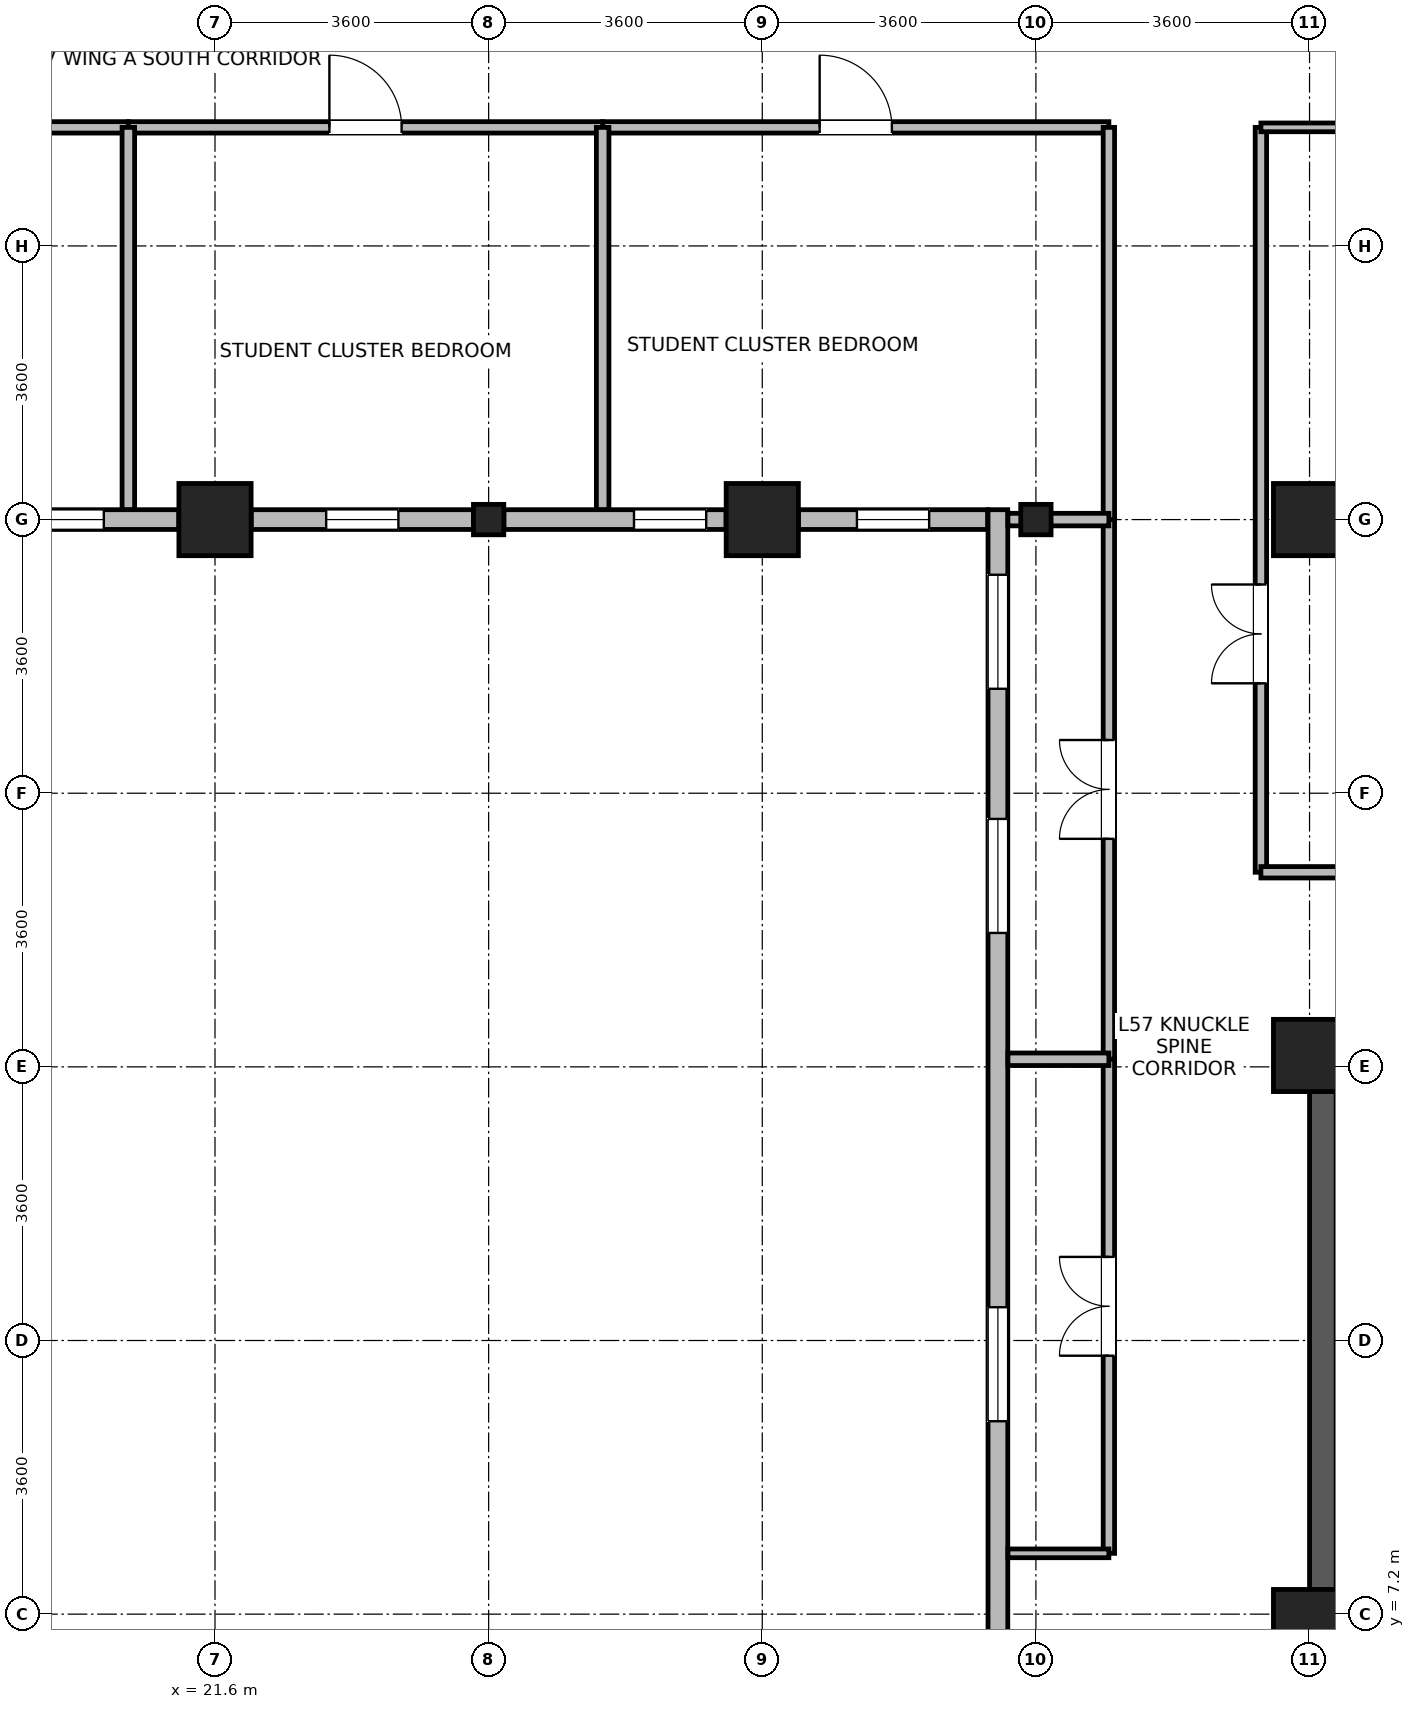
"""IFC4 building model, lengths in metres.
Left out: names, types, materials, properties, quantities, classifications, styles, units other than length and angle.
Written with IfcOpenShell. Run it as: python <this file> out.ifc"""

import sys

from ifc_helpers import new_model, si_unit, direction, frame, frame_2d, origin, origin_2d, place, context, subcontext, project, spatial, rectangle, i_section, extrude, source, transform, mapped, element, fill, save


model = new_model("IFC4")
c1 = context("Model", 3, precision=1e-05, world=origin(), true_north=direction((0.0, 1.0)))
c2 = subcontext(c1, "Body", "Model", "MODEL_VIEW")
j1 = project(units=[si_unit("LENGTHUNIT", "METRE"), si_unit("PLANEANGLEUNIT", "RADIAN")], contexts=[c1])
p1 = place(None, origin())
s1 = spatial("IfcSite", under=j1, at=p1, CompositionType="ELEMENT")
p2 = place(p1, origin())
s2 = spatial("IfcBuilding", under=s1, at=p2, CompositionType="ELEMENT")
p3 = place(p2, frame((0.0, 0.0, 224.0)))
s3 = spatial("IfcBuildingStorey", under=s2, at=p3, CompositionType="ELEMENT", Elevation=224.0)
p4 = place(p3, frame((36.175, 6.95, 0.0), z_axis=(0.0, 0.0, 1.0), x_axis=(0.0, 1.0, 0.0)))
e1 = element("IfcWall", 1, at=p4, inside=s3, PredefinedType="SHEAR", context=c2, shape_type="SweptSolid", body=[
    extrude(rectangle(XDim=7.7, YDim=0.35, at=frame_2d((3.85, 0.0))), origin(), (0.0, 0.0, 1.0), 3.47),
])
m1 = source(origin(), c2, "Body", "SweptSolid", [
    extrude(rectangle(XDim=0.95, YDim=0.95, at=origin_2d()), origin(), (0.0, 0.0, 1.0), 3.7),
])
for number, where, z_axis, x_axis in (
    (2, (21.6, 21.6, 0.0), (0.0, 0.0, 1.0), (1.0, 0.0, 0.0)),
    (3, (28.8, 21.6, 0.0), (0.0, 0.0, 1.0), (1.0, 0.0, 0.0)),
    (4, (36.0, 21.6, 0.0), (0.0, 0.0, 1.0), (1.0, 0.0, 0.0)),
    (5, (36.0, 7.05, 0.0), (0.0, 0.0, 1.0), (1.0, 0.0, 0.0)),
    (6, (36.0, 14.55, 0.0), (0.0, 0.0, 1.0), (1.0, 0.0, 0.0)),
):
    element("IfcColumn", number, at=place(p3, frame(where, z_axis=z_axis, x_axis=x_axis)), inside=s3, PredefinedType="COLUMN", context=c2, shape_type="MappedRepresentation", body=[
        mapped(m1, transform((0.0, 0.0, 0.0), x_axis=(1.0, 0.0, 0.0), y_axis=(0.0, 1.0, 0.0), z_axis=(0.0, 0.0, 1.0), scale=1.0)),
    ])
m2 = source(origin(), c2, "Body", "SweptSolid", [
    extrude(i_section(OverallWidth=0.399, OverallDepth=0.4, WebThickness=0.017, FlangeThickness=0.023, FilletRadius=0.015, at=origin_2d()), origin(), (0.0, 0.0, 1.0), 3.7),
])
for number, where, z_axis, x_axis in (
    (7, (25.2, 21.6, 0.0), (0.0, 0.0, 1.0), (1.0, 0.0, 0.0)),
    (8, (32.4, 21.6, 0.0), (0.0, 0.0, 1.0), (1.0, 0.0, 0.0)),
):
    element("IfcColumn", number, at=place(p3, frame(where, z_axis=z_axis, x_axis=x_axis)), inside=s3, PredefinedType="COLUMN", context=c2, shape_type="MappedRepresentation", body=[
        mapped(m2, transform((0.0, 0.0, 0.0), x_axis=(1.0, 0.0, 0.0), y_axis=(0.0, 1.0, 0.0), z_axis=(0.0, 0.0, 1.0), scale=1.0)),
    ])
p5 = place(p3, frame((21.124, 21.6, 0.0), z_axis=(0.0, 0.0, 1.0), x_axis=(-1.0, 0.0, 0.0)))
e9 = element("IfcWall", 9, at=p5, inside=s3, PredefinedType="STANDARD", context=c2, shape_type="SweptSolid", body=[
    extrude(rectangle(XDim=2.924, YDim=0.26, at=frame_2d((1.462, 0.0))), origin(), (0.0, 0.0, 1.0), 3.05),
])
p6 = place(p5, frame((0.987, 0.0, 0.85)))
e10 = element("IfcOpeningElement", 10, at=p6, cuts=e9, PredefinedType="OPENING", context=c2, shape_type="SweptSolid", body=[
    extrude(rectangle(XDim=0.95, YDim=1.75, at=frame_2d((0.475, 0.875))), frame((0.0, 0.14, 0.0), z_axis=(0.0, -1.0, 0.0), x_axis=(1.0, 0.0, 0.0)), (0.0, 0.0, 1.0), 0.28),
])
p7 = place(p3, frame((25.0, 21.6, 0.0), z_axis=(0.0, 0.0, 1.0), x_axis=(-1.0, 0.0, 0.0)))
e11 = element("IfcWall", 11, at=p7, inside=s3, PredefinedType="STANDARD", context=c2, shape_type="SweptSolid", body=[
    extrude(rectangle(XDim=2.924, YDim=0.26, at=frame_2d((1.462, 0.0))), origin(), (0.0, 0.0, 1.0), 3.05),
])
p8 = place(p7, frame((0.987, 0.0, 0.85)))
e12 = element("IfcOpeningElement", 12, at=p8, cuts=e11, PredefinedType="OPENING", context=c2, shape_type="SweptSolid", body=[
    extrude(rectangle(XDim=0.95, YDim=1.75, at=frame_2d((0.475, 0.875))), frame((0.0, 0.14, 0.0), z_axis=(0.0, -1.0, 0.0), x_axis=(1.0, 0.0, 0.0)), (0.0, 0.0, 1.0), 0.28),
])
p9 = place(p3, frame((28.324, 21.6, 0.0), z_axis=(0.0, 0.0, 1.0), x_axis=(-1.0, 0.0, 0.0)))
e13 = element("IfcWall", 13, at=p9, inside=s3, PredefinedType="STANDARD", context=c2, shape_type="SweptSolid", body=[
    extrude(rectangle(XDim=2.924, YDim=0.26, at=frame_2d((1.462, 0.0))), origin(), (0.0, 0.0, 1.0), 3.05),
])
p10 = place(p9, frame((0.262, 0.0, 0.85)))
e14 = element("IfcOpeningElement", 14, at=p10, cuts=e13, PredefinedType="OPENING", context=c2, shape_type="SweptSolid", body=[
    extrude(rectangle(XDim=0.95, YDim=1.75, at=frame_2d((0.475, 0.875))), frame((0.0, 0.14, 0.0), z_axis=(0.0, -1.0, 0.0), x_axis=(1.0, 0.0, 0.0)), (0.0, 0.0, 1.0), 0.28),
])
p11 = place(p3, frame((31.765, 21.6, 0.0), z_axis=(0.0, 0.0, 1.0), x_axis=(-1.0, 0.0, 0.0)))
e15 = element("IfcWall", 15, at=p11, inside=s3, PredefinedType="STANDARD", context=c2, shape_type="SweptSolid", body=[
    extrude(rectangle(XDim=2.489, YDim=0.26, at=frame_2d((1.245, 0.0))), origin(), (0.0, 0.0, 1.0), 3.05),
])
p12 = place(p11, frame((0.77, 0.0, 0.85)))
e16 = element("IfcOpeningElement", 16, at=p12, cuts=e15, PredefinedType="OPENING", context=c2, shape_type="SweptSolid", body=[
    extrude(rectangle(XDim=0.95, YDim=1.75, at=frame_2d((0.475, 0.875))), frame((0.0, 0.14, 0.0), z_axis=(0.0, -1.0, 0.0), x_axis=(1.0, 0.0, 0.0)), (0.0, 0.0, 1.0), 0.28),
])
p13 = place(p3, frame((31.9, 5.67, 0.0), z_axis=(0.0, 0.0, 1.0), x_axis=(0.0, 1.0, 0.0)))
e17 = element("IfcWall", 17, at=p13, inside=s3, PredefinedType="STANDARD", context=c2, shape_type="SweptSolid", body=[
    extrude(rectangle(XDim=16.06, YDim=0.26, at=frame_2d((8.03, 0.0))), origin(), (0.0, 0.0, 1.0), 3.45),
])
p14 = place(p13, frame((4.068, 0.0, 0.85)))
e18 = element("IfcOpeningElement", 18, at=p14, cuts=e17, PredefinedType="OPENING", context=c2, shape_type="SweptSolid", body=[
    extrude(rectangle(XDim=1.5, YDim=1.85, at=frame_2d((0.75, 0.925))), frame((0.0, 0.14, 0.0), z_axis=(0.0, -1.0, 0.0), x_axis=(1.0, 0.0, 0.0)), (0.0, 0.0, 1.0), 0.28),
])
p15 = place(p13, frame((10.492, 0.0, 0.85)))
e19 = element("IfcOpeningElement", 19, at=p15, cuts=e17, PredefinedType="OPENING", context=c2, shape_type="SweptSolid", body=[
    extrude(rectangle(XDim=1.5, YDim=1.85, at=frame_2d((0.75, 0.925))), frame((0.0, 0.14, 0.0), z_axis=(0.0, -1.0, 0.0), x_axis=(1.0, 0.0, 0.0)), (0.0, 0.0, 1.0), 0.28),
])
p16 = place(p13, frame((13.704, 0.0, 0.85)))
e20 = element("IfcOpeningElement", 20, at=p16, cuts=e17, PredefinedType="OPENING", context=c2, shape_type="SweptSolid", body=[
    extrude(rectangle(XDim=1.5, YDim=1.85, at=frame_2d((0.75, 0.925))), frame((0.0, 0.14, 0.0), z_axis=(0.0, -1.0, 0.0), x_axis=(1.0, 0.0, 0.0)), (0.0, 0.0, 1.0), 0.28),
])
p17 = place(p3, frame((35.36, 16.96, 0.0), z_axis=(0.0, 0.0, 1.0), x_axis=(0.0, 1.0, 0.0)))
e21 = element("IfcWall", 21, at=p17, inside=s3, PredefinedType="PARTITIONING", context=c2, shape_type="SweptSolid", body=[
    extrude(rectangle(XDim=9.8, YDim=0.15, at=frame_2d((4.9, 0.0))), origin(), (0.0, 0.0, 1.0), 3.45),
])
p18 = place(p17, frame((2.486, 0.0, 0.0)))
e22 = element("IfcOpeningElement", 22, at=p18, cuts=e21, PredefinedType="OPENING", context=c2, shape_type="SweptSolid", body=[
    extrude(rectangle(XDim=1.3, YDim=2.12, at=frame_2d((0.65, 1.06))), frame((0.0, 0.085, 0.0), z_axis=(0.0, -1.0, 0.0), x_axis=(1.0, 0.0, 0.0)), (0.0, 0.0, 1.0), 0.17),
])
p19 = place(p3, frame((33.36, 14.5, 0.0), z_axis=(0.0, 0.0, 1.0), x_axis=(0.0, 1.0, 0.0)))
e23 = element("IfcWall", 23, at=p19, inside=s3, PredefinedType="PARTITIONING", context=c2, shape_type="SweptSolid", body=[
    extrude(rectangle(XDim=7.1, YDim=0.15, at=frame_2d((3.55, 0.0))), origin(), (0.0, 0.0, 1.0), 3.45),
])
p20 = place(p19, frame((2.9, 0.0, 0.0)))
e24 = element("IfcOpeningElement", 24, at=p20, cuts=e23, PredefinedType="OPENING", context=c2, shape_type="SweptSolid", body=[
    extrude(rectangle(XDim=1.3, YDim=2.12, at=frame_2d((0.65, 1.06))), frame((0.0, 0.085, 0.0), z_axis=(0.0, -1.0, 0.0), x_axis=(1.0, 0.0, 0.0)), (0.0, 0.0, 1.0), 0.17),
])
p21 = place(p3, frame((35.36, 16.96, 0.0), z_axis=(0.0, 0.0, 1.0), x_axis=(1.0, 0.0, 0.0)))
e25 = element("IfcWall", 25, at=p21, inside=s3, PredefinedType="PARTITIONING", context=c2, shape_type="SweptSolid", body=[
    extrude(rectangle(XDim=6.66, YDim=0.15, at=frame_2d((3.33, 0.0))), origin(), (0.0, 0.0, 1.0), 3.45),
])
p22 = place(p3, frame((26.7, 26.76, 0.0), z_axis=(0.0, 0.0, 1.0), x_axis=(1.0, 0.0, 0.0)))
e26 = element("IfcWall", 26, at=p22, inside=s3, PredefinedType="PARTITIONING", context=c2, shape_type="SweptSolid", body=[
    extrude(rectangle(XDim=6.66, YDim=0.15, at=frame_2d((3.33, 0.0))), origin(), (0.0, 0.0, 1.0), 3.45),
])
p23 = place(p22, frame((2.855, 0.0, 0.0)))
e27 = element("IfcOpeningElement", 27, at=p23, cuts=e26, PredefinedType="OPENING", context=c2, shape_type="SweptSolid", body=[
    extrude(rectangle(XDim=0.95, YDim=2.1, at=frame_2d((0.475, 1.05))), frame((0.0, 0.085, 0.0), z_axis=(0.0, -1.0, 0.0), x_axis=(1.0, 0.0, 0.0)), (0.0, 0.0, 1.0), 0.17),
])
p24 = place(p3, frame((33.36, 8.0, 0.0), z_axis=(0.0, 0.0, 1.0), x_axis=(0.0, 1.0, 0.0)))
e28 = element("IfcWall", 28, at=p24, inside=s3, PredefinedType="PARTITIONING", context=c2, shape_type="SweptSolid", body=[
    extrude(rectangle(XDim=6.5, YDim=0.15, at=frame_2d((3.25, 0.0))), origin(), (0.0, 0.0, 1.0), 3.45),
])
p25 = place(p24, frame((2.6, 0.0, 0.0)))
e29 = element("IfcOpeningElement", 29, at=p25, cuts=e28, PredefinedType="OPENING", context=c2, shape_type="SweptSolid", body=[
    extrude(rectangle(XDim=1.3, YDim=2.12, at=frame_2d((0.65, 1.06))), frame((0.0, 0.085, 0.0), z_axis=(0.0, -1.0, 0.0), x_axis=(1.0, 0.0, 0.0)), (0.0, 0.0, 1.0), 0.17),
])
p26 = place(p3, frame((20.46, 26.76, 0.0), z_axis=(0.0, 0.0, 1.0), x_axis=(1.0, 0.0, 0.0)))
e30 = element("IfcWall", 30, at=p26, inside=s3, PredefinedType="PARTITIONING", context=c2, shape_type="SweptSolid", body=[
    extrude(rectangle(XDim=6.24, YDim=0.15, at=frame_2d((3.12, 0.0))), origin(), (0.0, 0.0, 1.0), 3.45),
])
p27 = place(p26, frame((2.645, 0.0, 0.0)))
e31 = element("IfcOpeningElement", 31, at=p27, cuts=e30, PredefinedType="OPENING", context=c2, shape_type="SweptSolid", body=[
    extrude(rectangle(XDim=0.95, YDim=2.1, at=frame_2d((0.475, 1.05))), frame((0.0, 0.085, 0.0), z_axis=(0.0, -1.0, 0.0), x_axis=(1.0, 0.0, 0.0)), (0.0, 0.0, 1.0), 0.17),
])
p28 = place(p3, frame((14.64, 26.76, 0.0), z_axis=(0.0, 0.0, 1.0), x_axis=(1.0, 0.0, 0.0)))
e32 = element("IfcWall", 32, at=p28, inside=s3, PredefinedType="PARTITIONING", context=c2, shape_type="SweptSolid", body=[
    extrude(rectangle(XDim=5.82, YDim=0.15, at=frame_2d((2.91, 0.0))), origin(), (0.0, 0.0, 1.0), 3.45),
])
p29 = place(p28, frame((2.435, 0.0, 0.0)))
e33 = element("IfcOpeningElement", 33, at=p29, cuts=e32, PredefinedType="OPENING", context=c2, shape_type="SweptSolid", body=[
    extrude(rectangle(XDim=0.95, YDim=2.1, at=frame_2d((0.475, 1.05))), frame((0.0, 0.085, 0.0), z_axis=(0.0, -1.0, 0.0), x_axis=(1.0, 0.0, 0.0)), (0.0, 0.0, 1.0), 0.17),
])
p30 = place(p3, frame((33.36, 21.6, 0.0), z_axis=(0.0, 0.0, 1.0), x_axis=(0.0, 1.0, 0.0)))
e34 = element("IfcWall", 34, at=p30, inside=s3, PredefinedType="PARTITIONING", context=c2, shape_type="SweptSolid", body=[
    extrude(rectangle(XDim=5.16, YDim=0.15, at=frame_2d((2.58, 0.0))), origin(), (0.0, 0.0, 1.0), 3.45),
])
p31 = place(p3, frame((35.36, 26.76, 0.0), z_axis=(0.0, 0.0, 1.0), x_axis=(1.0, 0.0, 0.0)))
e35 = element("IfcWall", 35, at=p31, inside=s3, PredefinedType="PARTITIONING", context=c2, shape_type="SweptSolid", body=[
    extrude(rectangle(XDim=6.66, YDim=0.115, at=frame_2d((3.33, 0.0))), origin(), (0.0, 0.0, 1.0), 3.45),
])
for number, where, z_axis, x_axis in (
    (36, (20.46, 21.732, 0.0), (0.0, 0.0, 1.0), (0.0, 1.0, 0.0)),
    (37, (26.7, 21.732, 0.0), (0.0, 0.0, 1.0), (0.0, 1.0, 0.0)),
):
    element("IfcWall", number, at=place(p3, frame(where, z_axis=z_axis, x_axis=x_axis)), inside=s3, PredefinedType="PARTITIONING", context=c2, shape_type="SweptSolid", body=[
        extrude(rectangle(XDim=5.028, YDim=0.165, at=frame_2d((2.514, 0.0))), origin(), (0.0, 0.0, 1.0), 3.45),
    ])
p32 = place(p3, frame((32.032, 8.0, 0.0), z_axis=(0.0, 0.0, 1.0), x_axis=(1.0, 0.0, 0.0)))
e38 = element("IfcWall", 38, at=p32, inside=s3, PredefinedType="PARTITIONING", context=c2, shape_type="SweptSolid", body=[
    extrude(rectangle(XDim=1.328, YDim=0.115, at=frame_2d((0.664, 0.0))), origin(), (0.0, 0.0, 1.0), 3.45),
])
p33 = place(p3, frame((32.032, 14.5, 0.0), z_axis=(0.0, 0.0, 1.0), x_axis=(1.0, 0.0, 0.0)))
e39 = element("IfcWall", 39, at=p33, inside=s3, PredefinedType="PARTITIONING", context=c2, shape_type="SweptSolid", body=[
    extrude(rectangle(XDim=1.328, YDim=0.165, at=frame_2d((0.664, 0.0))), origin(), (0.0, 0.0, 1.0), 3.45),
])
p34 = place(p3, frame((32.032, 21.6, 0.0), z_axis=(0.0, 0.0, 1.0), x_axis=(1.0, 0.0, 0.0)))
e40 = element("IfcWall", 40, at=p34, inside=s3, PredefinedType="PARTITIONING", context=c2, shape_type="SweptSolid", body=[
    extrude(rectangle(XDim=1.328, YDim=0.165, at=frame_2d((0.664, 0.0))), origin(), (0.0, 0.0, 1.0), 3.05),
])
p35 = place(p6, origin())
e41 = element("IfcWindow", 41, at=p35, inside=s3, PartitioningType="SINGLE_PANEL", PredefinedType="WINDOW", context=c2, shape_type="SweptSolid", body=[
    extrude(rectangle(XDim=0.95, YDim=1.75, at=frame_2d((0.475, 0.875))), frame((0.0, 0.03, 0.0), z_axis=(0.0, -1.0, 0.0), x_axis=(1.0, 0.0, 0.0)), (0.0, 0.0, 1.0), 0.06),
])
fill(e10, e41)
p36 = place(p8, origin())
e42 = element("IfcWindow", 42, at=p36, inside=s3, PartitioningType="SINGLE_PANEL", PredefinedType="WINDOW", context=c2, shape_type="SweptSolid", body=[
    extrude(rectangle(XDim=0.95, YDim=1.75, at=frame_2d((0.475, 0.875))), frame((0.0, 0.03, 0.0), z_axis=(0.0, -1.0, 0.0), x_axis=(1.0, 0.0, 0.0)), (0.0, 0.0, 1.0), 0.06),
])
fill(e12, e42)
p37 = place(p10, origin())
e43 = element("IfcWindow", 43, at=p37, inside=s3, PartitioningType="SINGLE_PANEL", PredefinedType="WINDOW", context=c2, shape_type="SweptSolid", body=[
    extrude(rectangle(XDim=0.95, YDim=1.75, at=frame_2d((0.475, 0.875))), frame((0.0, 0.03, 0.0), z_axis=(0.0, -1.0, 0.0), x_axis=(1.0, 0.0, 0.0)), (0.0, 0.0, 1.0), 0.06),
])
fill(e14, e43)
p38 = place(p12, origin())
e44 = element("IfcWindow", 44, at=p38, inside=s3, PartitioningType="SINGLE_PANEL", PredefinedType="WINDOW", context=c2, shape_type="SweptSolid", body=[
    extrude(rectangle(XDim=0.95, YDim=1.75, at=frame_2d((0.475, 0.875))), frame((0.0, 0.03, 0.0), z_axis=(0.0, -1.0, 0.0), x_axis=(1.0, 0.0, 0.0)), (0.0, 0.0, 1.0), 0.06),
])
fill(e16, e44)
p39 = place(p14, origin())
e45 = element("IfcWindow", 45, at=p39, inside=s3, PartitioningType="SINGLE_PANEL", PredefinedType="WINDOW", context=c2, shape_type="SweptSolid", body=[
    extrude(rectangle(XDim=1.5, YDim=1.85, at=frame_2d((0.75, 0.925))), frame((0.0, 0.03, 0.0), z_axis=(0.0, -1.0, 0.0), x_axis=(1.0, 0.0, 0.0)), (0.0, 0.0, 1.0), 0.06),
])
fill(e18, e45)
p40 = place(p15, origin())
e46 = element("IfcWindow", 46, at=p40, inside=s3, PartitioningType="SINGLE_PANEL", PredefinedType="WINDOW", context=c2, shape_type="SweptSolid", body=[
    extrude(rectangle(XDim=1.5, YDim=1.85, at=frame_2d((0.75, 0.925))), frame((0.0, 0.03, 0.0), z_axis=(0.0, -1.0, 0.0), x_axis=(1.0, 0.0, 0.0)), (0.0, 0.0, 1.0), 0.06),
])
fill(e19, e46)
p41 = place(p16, origin())
e47 = element("IfcWindow", 47, at=p41, inside=s3, PartitioningType="SINGLE_PANEL", PredefinedType="WINDOW", context=c2, shape_type="SweptSolid", body=[
    extrude(rectangle(XDim=1.5, YDim=1.85, at=frame_2d((0.75, 0.925))), frame((0.0, 0.03, 0.0), z_axis=(0.0, -1.0, 0.0), x_axis=(1.0, 0.0, 0.0)), (0.0, 0.0, 1.0), 0.06),
])
fill(e20, e47)
p42 = place(p18, origin())
e48 = element("IfcDoor", 48, at=p42, inside=s3, OperationType="DOUBLE_DOOR_SINGLE_SWING", PredefinedType="DOOR", context=c2, shape_type="SweptSolid", body=[
    extrude(rectangle(XDim=1.3, YDim=2.12, at=frame_2d((0.65, 1.06))), frame((0.0, 0.025, 0.0), z_axis=(0.0, -1.0, 0.0), x_axis=(1.0, 0.0, 0.0)), (0.0, 0.0, 1.0), 0.05),
])
fill(e22, e48)
p43 = place(p20, origin())
e49 = element("IfcDoor", 49, at=p43, inside=s3, OperationType="DOUBLE_DOOR_SINGLE_SWING", PredefinedType="DOOR", context=c2, shape_type="SweptSolid", body=[
    extrude(rectangle(XDim=1.3, YDim=2.12, at=frame_2d((0.65, 1.06))), frame((0.0, 0.025, 0.0), z_axis=(0.0, -1.0, 0.0), x_axis=(1.0, 0.0, 0.0)), (0.0, 0.0, 1.0), 0.05),
])
fill(e24, e49)
p44 = place(p23, origin())
e50 = element("IfcDoor", 50, at=p44, inside=s3, OperationType="SINGLE_SWING_LEFT", PredefinedType="DOOR", context=c2, shape_type="SweptSolid", body=[
    extrude(rectangle(XDim=0.95, YDim=2.1, at=frame_2d((0.475, 1.05))), frame((0.0, 0.025, 0.0), z_axis=(0.0, -1.0, 0.0), x_axis=(1.0, 0.0, 0.0)), (0.0, 0.0, 1.0), 0.05),
])
fill(e27, e50)
p45 = place(p25, origin())
e51 = element("IfcDoor", 51, at=p45, inside=s3, OperationType="DOUBLE_DOOR_SINGLE_SWING", PredefinedType="DOOR", context=c2, shape_type="SweptSolid", body=[
    extrude(rectangle(XDim=1.3, YDim=2.12, at=frame_2d((0.65, 1.06))), frame((0.0, 0.025, 0.0), z_axis=(0.0, -1.0, 0.0), x_axis=(1.0, 0.0, 0.0)), (0.0, 0.0, 1.0), 0.05),
])
fill(e29, e51)
p46 = place(p27, origin())
e52 = element("IfcDoor", 52, at=p46, inside=s3, OperationType="SINGLE_SWING_LEFT", PredefinedType="DOOR", context=c2, shape_type="SweptSolid", body=[
    extrude(rectangle(XDim=0.95, YDim=2.1, at=frame_2d((0.475, 1.05))), frame((0.0, 0.025, 0.0), z_axis=(0.0, -1.0, 0.0), x_axis=(1.0, 0.0, 0.0)), (0.0, 0.0, 1.0), 0.05),
])
fill(e31, e52)
save(model, sys.argv[1])
